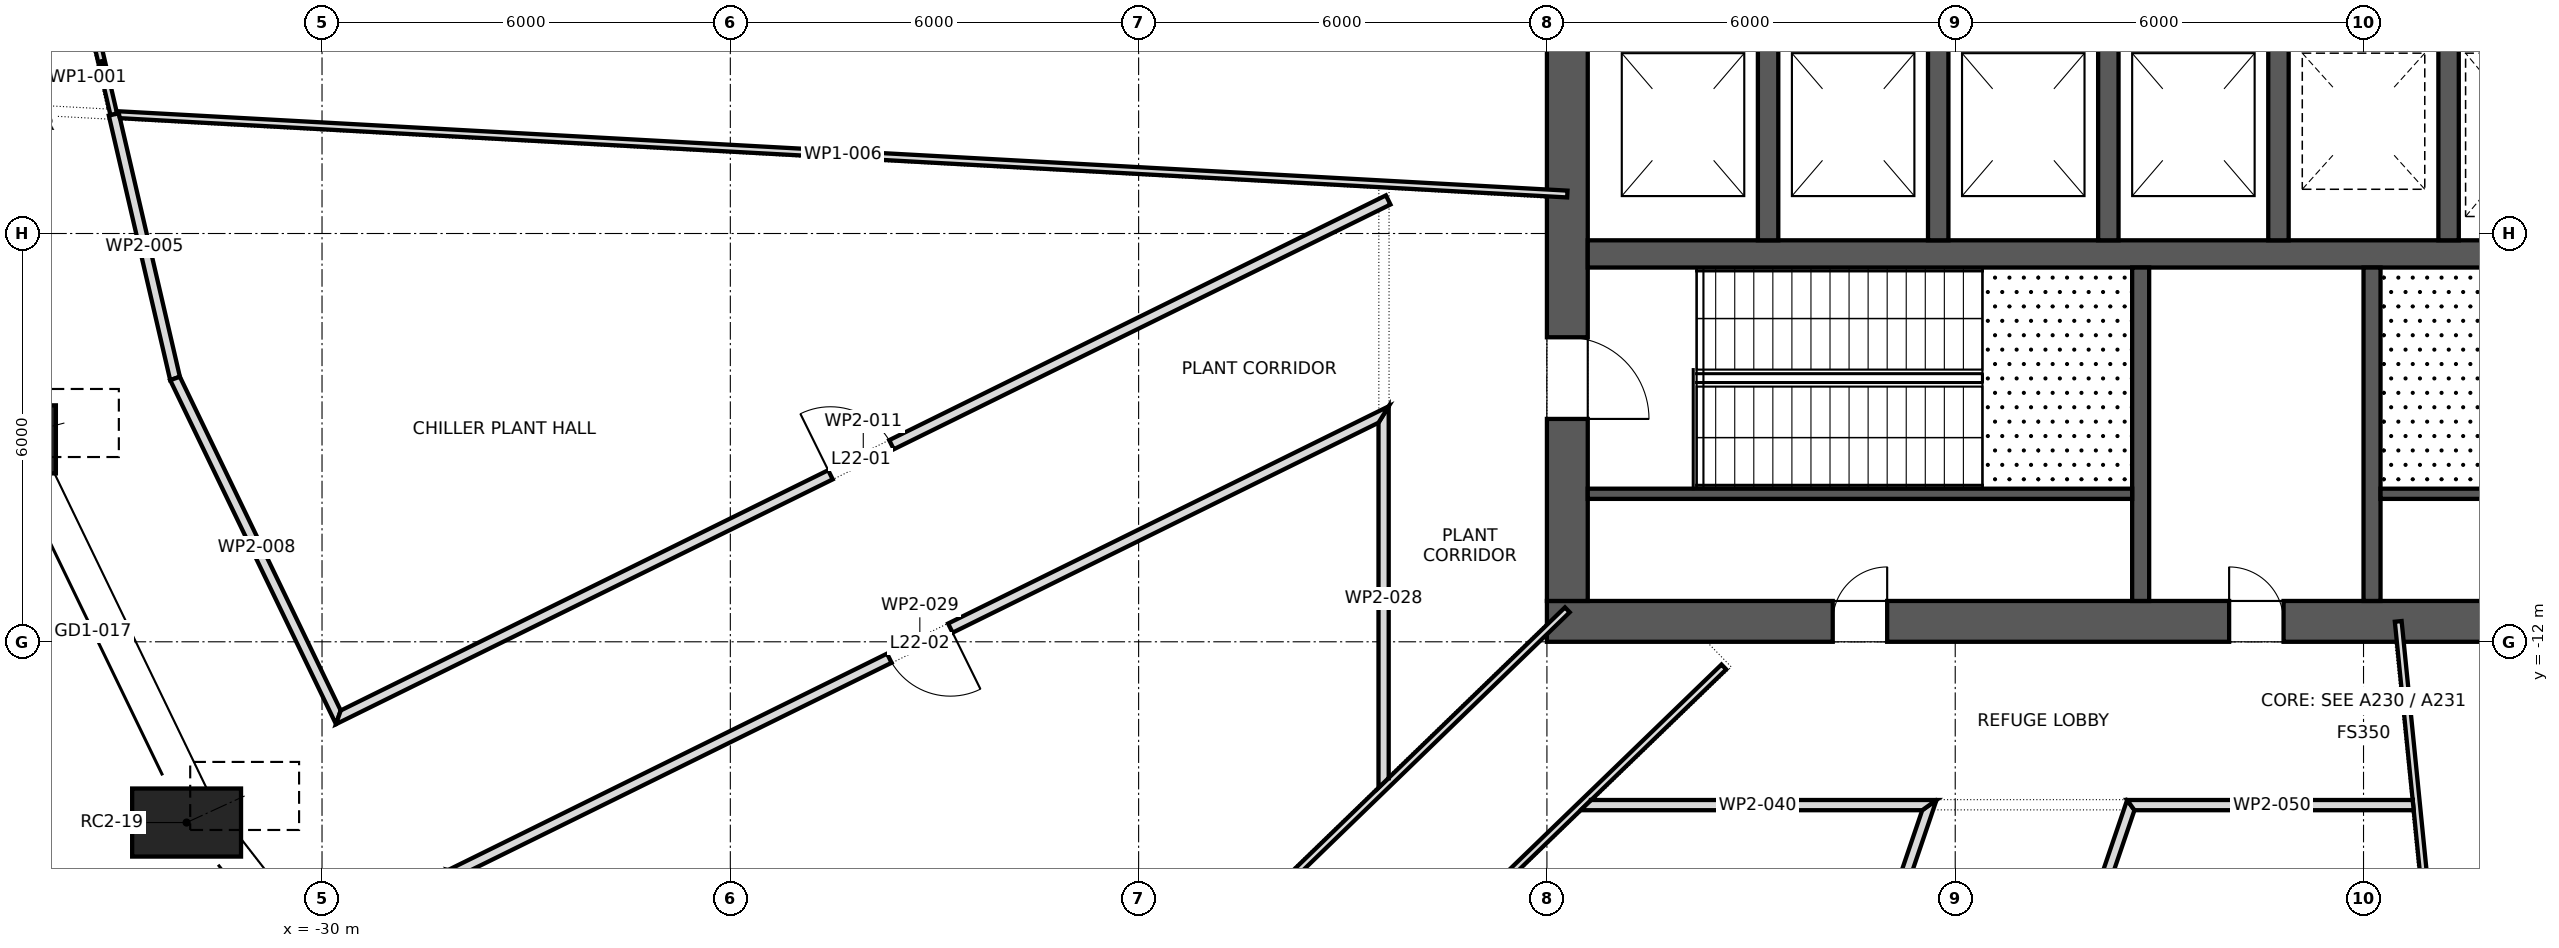
"""IFC4 building model, lengths in metres.
Left out: names, types, materials, properties, quantities, classifications, styles, units other than length and angle.
Written with IfcOpenShell. Run it as: python <this file> out.ifc"""

import sys

from ifc_helpers import new_model, si_unit, direction, frame, frame_2d, origin, origin_2d, place, context, subcontext, project, spatial, polyline, rectangle, outline, extrude, element, fill, save


model = new_model("IFC4")
c1 = context("Model", 3, precision=1e-05, world=origin(), true_north=direction((0.0, 1.0)))
c2 = subcontext(c1, "Body", "Model", "MODEL_VIEW")
j1 = project(units=[si_unit("LENGTHUNIT", "METRE"), si_unit("PLANEANGLEUNIT", "RADIAN")], contexts=[c1])
p1 = place(None, origin())
s1 = spatial("IfcSite", under=j1, at=p1, CompositionType="ELEMENT")
p2 = place(p1, origin())
s2 = spatial("IfcBuilding", under=s1, at=p2, CompositionType="ELEMENT")
p3 = place(p2, frame((0.0, 0.0, 99.1)))
s3 = spatial("IfcBuildingStorey", under=s2, at=p3, CompositionType="ELEMENT", Elevation=99.1)
p4 = place(p3, frame((-34.711, -9.025, 0.09), z_axis=(0.174299234712, 0.045357362213, 0.983647541791), x_axis=(-0.251839594723, 0.967768990271, 0.0)))
e1 = element("IfcColumn", 1, at=p4, inside=s3, PredefinedType="COLUMN", context=c2, shape_type="SweptSolid", body=[
    extrude(rectangle(XDim=1.6, YDim=1.0, at=origin_2d()), origin(), (0.0, 0.0, 1.0), 5.307),
])
p5 = place(p3, frame((-31.99, -14.656, 0.088), z_axis=(0.160721780276, 0.073644982891, 0.984248406572), x_axis=(-0.416565116305, 0.909105881555, 0.0)))
e2 = element("IfcColumn", 2, at=p5, inside=s3, PredefinedType="COLUMN", context=c2, shape_type="SweptSolid", body=[
    extrude(rectangle(XDim=1.6, YDim=1.0, at=origin_2d()), origin(), (0.0, 0.0, 1.0), 5.307),
])
p6 = place(p3, frame((-12.0, -11.7, 0.0), z_axis=(0.0, 0.0, 1.0), x_axis=(1.0, 0.0, 0.0)))
e3 = element("IfcWall", 3, at=p6, inside=s3, PredefinedType="SHEAR", context=c2, shape_type="SweptSolid", body=[
    extrude(rectangle(XDim=24.0, YDim=0.6, at=frame_2d((12.0, 0.0))), origin(), (0.0, 0.0, 1.0), 5.4),
])
p7 = place(p6, frame((10.025, 0.0, 0.0)))
e4 = element("IfcOpeningElement", 4, at=p7, cuts=e3, PredefinedType="OPENING", context=c2, shape_type="SweptSolid", body=[
    extrude(rectangle(XDim=0.8, YDim=2.1, at=frame_2d((0.4, 1.05))), frame((0.0, 0.312, 0.0), z_axis=(0.0, -1.0, 0.0), x_axis=(1.0, 0.0, 0.0)), (0.0, 0.0, 1.0), 0.624),
])
p8 = place(p6, frame((4.2, 0.0, 0.0)))
e5 = element("IfcOpeningElement", 5, at=p8, cuts=e3, PredefinedType="OPENING", context=c2, shape_type="SweptSolid", body=[
    extrude(rectangle(XDim=0.8, YDim=2.1, at=frame_2d((0.4, 1.05))), frame((0.0, 0.312, 0.0), z_axis=(0.0, -1.0, 0.0), x_axis=(1.0, 0.0, 0.0)), (0.0, 0.0, 1.0), 0.624),
])
p9 = place(p6, frame((15.85, 0.0, 0.0)))
e6 = element("IfcOpeningElement", 6, at=p9, cuts=e3, PredefinedType="OPENING", context=c2, shape_type="SweptSolid", body=[
    extrude(rectangle(XDim=0.8, YDim=2.1, at=frame_2d((0.4, 1.05))), frame((0.0, 0.312, 0.0), z_axis=(0.0, -1.0, 0.0), x_axis=(1.0, 0.0, 0.0)), (0.0, 0.0, 1.0), 0.624),
])
p10 = place(p3, frame((-11.7, -11.4, 0.0), z_axis=(0.0, 0.0, 1.0), x_axis=(0.0, 1.0, 0.0)))
e7 = element("IfcWall", 7, at=p10, inside=s3, PredefinedType="SHEAR", context=c2, shape_type="SweptSolid", body=[
    extrude(rectangle(XDim=22.8, YDim=0.6, at=frame_2d((11.4, 0.0))), origin(), (0.0, 0.0, 1.0), 5.4),
])
p11 = place(p10, frame((10.2, 0.0, 0.0)))
e8 = element("IfcOpeningElement", 8, at=p11, cuts=e7, PredefinedType="OPENING", context=c2, shape_type="SweptSolid", body=[
    extrude(rectangle(XDim=2.4, YDim=2.1, at=frame_2d((1.2, 1.05))), frame((0.0, 0.312, 0.0), z_axis=(0.0, -1.0, 0.0), x_axis=(1.0, 0.0, 0.0)), (0.0, 0.0, 1.0), 0.624),
])
p12 = place(p10, frame((18.925, 0.0, 0.0)))
e9 = element("IfcOpeningElement", 9, at=p12, cuts=e7, PredefinedType="OPENING", context=c2, shape_type="SweptSolid", body=[
    extrude(rectangle(XDim=1.2, YDim=2.1, at=frame_2d((0.6, 1.05))), frame((0.0, 0.312, 0.0), z_axis=(0.0, -1.0, 0.0), x_axis=(1.0, 0.0, 0.0)), (0.0, 0.0, 1.0), 0.624),
])
p13 = place(p10, frame((2.675, 0.0, 0.0)))
e10 = element("IfcOpeningElement", 10, at=p13, cuts=e7, PredefinedType="OPENING", context=c2, shape_type="SweptSolid", body=[
    extrude(rectangle(XDim=1.2, YDim=2.1, at=frame_2d((0.6, 1.05))), frame((0.0, 0.312, 0.0), z_axis=(0.0, -1.0, 0.0), x_axis=(1.0, 0.0, 0.0)), (0.0, 0.0, 1.0), 0.624),
])
p14 = place(p3, frame((-11.4, -6.3, 0.0), z_axis=(0.0, 0.0, 1.0), x_axis=(1.0, 0.0, 0.0)))
e11 = element("IfcWall", 11, at=p14, inside=s3, PredefinedType="SHEAR", context=c2, shape_type="SweptSolid", body=[
    extrude(rectangle(XDim=22.8, YDim=0.4, at=frame_2d((11.4, 0.0))), origin(), (0.0, 0.0, 1.0), 5.4),
])
p15 = place(p14, frame((20.85, 0.0, 0.0)))
e12 = element("IfcOpeningElement", 12, at=p15, cuts=e11, PredefinedType="OPENING", context=c2, shape_type="SweptSolid", body=[
    extrude(rectangle(XDim=1.1, YDim=2.1, at=frame_2d((0.55, 1.05))), frame((0.0, 0.212, 0.0), z_axis=(0.0, -1.0, 0.0), x_axis=(1.0, 0.0, 0.0)), (0.0, 0.0, 1.0), 0.424),
])
for number, where, z_axis, x_axis in (
    (13, (-8.75, -6.1, 0.0), (0.0, 0.0, 1.0), (0.0, 1.0, 0.0)),
    (14, (-6.25, -6.1, 0.0), (0.0, 0.0, 1.0), (0.0, 1.0, 0.0)),
    (15, (-3.75, -6.1, 0.0), (0.0, 0.0, 1.0), (0.0, 1.0, 0.0)),
    (16, (-1.25, -6.1, 0.0), (0.0, 0.0, 1.0), (0.0, 1.0, 0.0)),
    (17, (1.25, -6.1, 0.0), (0.0, 0.0, 1.0), (0.0, 1.0, 0.0)),
):
    element("IfcWall", number, at=place(p3, frame(where, z_axis=z_axis, x_axis=x_axis)), inside=s3, PredefinedType="SHEAR", context=c2, shape_type="SweptSolid", body=[
        extrude(rectangle(XDim=2.9, YDim=0.3, at=frame_2d((1.45, 0.0))), origin(), (0.0, 0.0, 1.0), 5.4),
    ])
for number, where, z_axis, x_axis in (
    (18, (-3.275, -11.4, 0.0), (0.0, 0.0, 1.0), (0.0, 1.0, 0.0)),
    (19, (0.125, -11.4, 0.0), (0.0, 0.0, 1.0), (0.0, 1.0, 0.0)),
):
    element("IfcWall", number, at=place(p3, frame(where, z_axis=z_axis, x_axis=x_axis)), inside=s3, PredefinedType="SHEAR", context=c2, shape_type="SweptSolid", body=[
        extrude(rectangle(XDim=4.9, YDim=0.25, at=frame_2d((2.45, 0.0))), origin(), (0.0, 0.0, 1.0), 5.1),
    ])
for number, where, z_axis, x_axis in (
    (20, (-11.4, -9.825, 0.0), (0.0, 0.0, 1.0), (1.0, 0.0, 0.0)),
    (21, (0.25, -9.825, 0.0), (0.0, 0.0, 1.0), (1.0, 0.0, 0.0)),
):
    element("IfcWall", number, at=place(p3, frame(where, z_axis=z_axis, x_axis=x_axis)), inside=s3, PredefinedType="SHEAR", context=c2, shape_type="SweptSolid", body=[
        extrude(rectangle(XDim=8.0, YDim=0.15, at=frame_2d((4.0, 0.0))), origin(), (0.0, 0.0, 1.0), 5.1),
    ])
p16 = place(p3, frame((-33.411, -2.734, 0.0), z_axis=(0.0, 0.0, 1.0), x_axis=(0.225810628432, -0.974171217029, 0.0)))
e22 = element("IfcWall", 22, at=p16, inside=s3, PredefinedType="PARTITIONING", context=c2, shape_type="SweptSolid", body=[
    extrude(outline(polyline([(1.556, 0.05), (0.011, 0.05), (0.0, -0.05), (1.556, -0.05), (1.556, 0.05)])), origin(), (0.0, 0.0, 1.0), 5.1),
])
p17 = place(p3, frame((-33.06, -4.25, 0.0), z_axis=(0.0, 0.0, 1.0), x_axis=(0.225949368313, -0.974139047035, 0.0)))
e23 = element("IfcWall", 23, at=p17, inside=s3, PredefinedType="PARTITIONING", context=c2, shape_type="SweptSolid", body=[
    extrude(outline(polyline([(0.0, -0.075), (1.996, -0.075), (3.991, -0.075), (3.975, 0.075), (1.987, 0.075), (0.0, 0.075), (0.0, -0.075)])), origin(), (0.0, 0.0, 1.0), 5.1),
])
p18 = place(p3, frame((-33.022, -4.252, 0.0), z_axis=(0.0, 0.0, 1.0), x_axis=(0.998503734749, -0.054683559624, 0.0)))
e24 = element("IfcWall", 24, at=p18, inside=s3, PredefinedType="PARTITIONING", context=c2, shape_type="SweptSolid", body=[
    extrude(outline(polyline([(0.0, 0.05), (0.0, 0.049), (0.01, 0.014), (0.034, 0.021), (0.055, -0.05), (1.991, -0.05), (3.927, -0.05), (5.864, -0.05), (7.8, -0.05), (9.736, -0.05), (11.673, -0.05), (13.609, -0.05), (15.545, -0.05), (17.482, -0.05), (19.418, -0.05), (21.354, -0.05), (21.354, 0.05), (19.413, 0.05), (17.472, 0.05), (15.53, 0.05), (13.589, 0.05), (11.648, 0.05), (9.707, 0.05), (7.765, 0.05), (5.824, 0.05), (3.883, 0.05), (1.941, 0.05), (0.0, 0.05)])), origin(), (0.0, 0.0, 1.0), 5.1),
])
p19 = place(p3, frame((-32.164, -8.123, 0.0), z_axis=(0.0, 0.0, 1.0), x_axis=(0.434115125131, -0.900857401664, 0.0)))
e25 = element("IfcWall", 25, at=p19, inside=s3, PredefinedType="PARTITIONING", context=c2, shape_type="SweptSolid", body=[
    extrude(outline(polyline([(5.612, -0.075), (5.612, -0.075), (5.461, 0.075), (3.646, 0.075), (1.831, 0.075), (0.017, 0.075), (0.0, -0.074), (0.0, -0.075), (1.871, -0.075), (3.741, -0.075), (5.612, -0.075)])), origin(), (0.0, 0.0, 1.0), 5.1),
])
p20 = place(p3, frame((-29.828, -13.143, 0.0), z_axis=(0.0, 0.0, 1.0), x_axis=(0.896984577942, 0.442061836098, 0.0)))
e26 = element("IfcWall", 26, at=p20, inside=s3, PredefinedType="PARTITIONING", context=c2, shape_type="SweptSolid", body=[
    extrude(outline(polyline([(17.275, 0.075), (15.372, 0.075), (13.469, 0.075), (11.567, 0.075), (9.664, 0.075), (7.762, 0.075), (5.859, 0.075), (3.957, 0.075), (2.054, 0.075), (0.151, 0.075), (0.0, -0.075), (1.919, -0.075), (3.839, -0.075), (5.758, -0.075), (7.678, -0.075), (9.597, -0.075), (11.517, -0.075), (13.436, -0.075), (15.355, -0.075), (17.275, -0.075), (17.275, 0.075)])), origin(), (0.0, 0.0, 1.0), 5.1),
])
p21 = place(p20, frame((8.138, 0.0, 0.0)))
e27 = element("IfcOpeningElement", 27, at=p21, cuts=e26, PredefinedType="OPENING", context=c2, shape_type="SweptSolid", body=[
    extrude(rectangle(XDim=1.0, YDim=2.1, at=frame_2d((0.5, 1.05))), frame((0.0, 0.087, 0.0), z_axis=(0.0, -1.0, 0.0), x_axis=(1.0, 0.0, 0.0)), (0.0, 0.0, 1.0), 0.174),
])
p22 = place(p3, frame((-21.89, -21.391, 0.0), z_axis=(0.0, 0.0, 1.0), x_axis=(0.718607137454, 0.695416265269, 0.0)))
e28 = element("IfcWall", 28, at=p22, inside=s3, PredefinedType="PARTITIONING", context=c2, shape_type="SweptSolid", body=[
    extrude(outline(polyline([(14.18, 0.05), (12.378, 0.05), (10.576, 0.05), (10.573, 0.047), (10.57, 0.05), (8.811, 0.05), (7.052, 0.05), (5.292, 0.05), (3.533, 0.05), (1.774, 0.05), (0.015, 0.05), (0.019, 0.007), (0.0, 0.005), (0.0, -0.05), (1.772, -0.05), (3.545, -0.05), (5.318, -0.05), (7.09, -0.05), (8.863, -0.05), (10.635, -0.05), (12.408, -0.05), (14.18, -0.05), (14.18, 0.05)])), origin(), (0.0, 0.0, 1.0), 5.1),
])
p23 = place(p3, frame((-20.003, -22.624, 0.0), z_axis=(0.0, 0.0, 1.0), x_axis=(0.718850780889, 0.695164408478, 0.0)))
e29 = element("IfcWall", 29, at=p23, inside=s3, PredefinedType="PARTITIONING", context=c2, shape_type="SweptSolid", body=[
    extrude(outline(polyline([(0.054, -0.05), (2.043, -0.05), (4.031, -0.05), (6.02, -0.05), (8.008, -0.05), (9.997, -0.05), (11.985, -0.05), (11.987, -0.048), (11.989, -0.05), (13.369, -0.05), (14.75, -0.05), (14.75, 0.05), (12.906, 0.05), (11.062, 0.05), (9.219, 0.05), (7.375, 0.05), (5.531, 0.05), (3.688, 0.05), (1.844, 0.05), (0.0, 0.05), (0.0, 0.049), (0.01, 0.014), (0.034, 0.021), (0.054, -0.05)])), origin(), (0.0, 0.0, 1.0), 5.1),
])
p24 = place(p3, frame((-14.4, -14.147, 0.0), z_axis=(0.0, 0.0, 1.0), x_axis=(0.0, 1.0, 0.0)))
e30 = element("IfcWall", 30, at=p24, inside=s3, PredefinedType="PARTITIONING", context=c2, shape_type="SweptSolid", body=[
    extrude(outline(polyline([(0.146, -0.075), (1.967, -0.075), (3.787, -0.075), (5.608, -0.075), (5.487, 0.0), (5.367, 0.075), (3.578, 0.075), (1.79, 0.075), (0.001, 0.075), (0.146, -0.075)])), origin(), (0.0, 0.0, 1.0), 5.1),
])
p25 = place(p3, frame((-14.292, -8.607, 0.0), z_axis=(0.0, 0.0, 1.0), x_axis=(-0.896913310142, -0.442206415703, 0.0)))
e31 = element("IfcWall", 31, at=p25, inside=s3, PredefinedType="PARTITIONING", context=c2, shape_type="SweptSolid", body=[
    extrude(outline(polyline([(0.0, -0.075), (1.926, -0.075), (3.853, -0.075), (5.779, -0.075), (7.705, -0.075), (9.631, -0.075), (11.557, -0.075), (13.483, -0.075), (15.409, -0.075), (15.225, 0.075), (13.352, 0.075), (11.479, 0.075), (9.606, 0.075), (7.733, 0.075), (5.86, 0.075), (3.987, 0.075), (2.114, 0.075), (0.241, 0.075), (0.0, -0.075)])), origin(), (0.0, 0.0, 1.0), 5.1),
])
p26 = place(p25, frame((7.219, 0.0, 0.0)))
e32 = element("IfcOpeningElement", 32, at=p26, cuts=e31, PredefinedType="OPENING", context=c2, shape_type="SweptSolid", body=[
    extrude(rectangle(XDim=1.0, YDim=2.1, at=frame_2d((0.5, 1.05))), frame((0.0, 0.087, 0.0), z_axis=(0.0, -1.0, 0.0), x_axis=(1.0, 0.0, 0.0)), (0.0, 0.0, 1.0), 0.174),
])
p27 = place(p3, frame((-10.645, -26.942, 0.0), z_axis=(0.0, 0.0, 1.0), x_axis=(0.321926990849, 0.946764496886, 0.0)))
e33 = element("IfcWall", 33, at=p27, inside=s3, PredefinedType="PARTITIONING", context=c2, shape_type="SweptSolid", body=[
    extrude(outline(polyline([(13.352, -0.075), (13.352, -0.075), (13.143, 0.075), (11.287, 0.075), (9.431, 0.075), (7.575, 0.075), (5.719, 0.075), (3.864, 0.075), (2.008, 0.075), (0.152, 0.075), (0.0, -0.075), (1.907, -0.075), (3.815, -0.075), (5.722, -0.075), (7.63, -0.075), (9.537, -0.075), (11.444, -0.075), (13.352, -0.075)])), origin(), (0.0, 0.0, 1.0), 5.1),
])
p28 = place(p27, frame((6.162, 0.0, 0.0)))
e34 = element("IfcOpeningElement", 34, at=p28, cuts=e33, PredefinedType="OPENING", context=c2, shape_type="SweptSolid", body=[
    extrude(rectangle(XDim=1.0, YDim=2.1, at=frame_2d((0.5, 1.05))), frame((0.0, 0.087, 0.0), z_axis=(0.0, -1.0, 0.0), x_axis=(1.0, 0.0, 0.0)), (0.0, 0.0, 1.0), 0.174),
])
p29 = place(p3, frame((-6.275, -14.4, 0.0), z_axis=(0.0, 0.0, 1.0), x_axis=(-1.0, 0.0, 0.0)))
e35 = element("IfcWall", 35, at=p29, inside=s3, PredefinedType="PARTITIONING", context=c2, shape_type="SweptSolid", body=[
    extrude(outline(polyline([(0.0, -0.075), (1.691, -0.075), (3.383, -0.075), (5.074, -0.075), (5.229, 0.075), (5.229, 0.075), (3.556, 0.075), (1.882, 0.075), (0.209, 0.075), (0.104, 0.0), (0.0, -0.075), (0.0, -0.075)])), origin(), (0.0, 0.0, 1.0), 5.1),
])
p30 = place(p3, frame((-3.403, -14.349, 0.0), z_axis=(0.0, 0.0, 1.0), x_axis=(-0.32208303293, -0.946711423771, 0.0)))
e36 = element("IfcWall", 36, at=p30, inside=s3, PredefinedType="PARTITIONING", context=c2, shape_type="SweptSolid", body=[
    extrude(outline(polyline([(0.0, -0.075), (1.994, -0.075), (3.988, -0.075), (5.982, -0.075), (7.976, -0.075), (9.97, -0.075), (11.964, -0.075), (13.958, -0.075), (13.782, 0.075), (11.829, 0.075), (9.875, 0.075), (7.922, 0.075), (5.968, 0.075), (4.015, 0.075), (2.061, 0.075), (0.107, 0.075), (0.0, -0.075)])), origin(), (0.0, 0.0, 1.0), 5.1),
])
p31 = place(p30, frame((6.462, 0.0, 0.0)))
e37 = element("IfcOpeningElement", 37, at=p31, cuts=e36, PredefinedType="OPENING", context=c2, shape_type="SweptSolid", body=[
    extrude(rectangle(XDim=1.0, YDim=2.1, at=frame_2d((0.5, 1.05))), frame((0.0, 0.087, 0.0), z_axis=(0.0, -1.0, 0.0), x_axis=(1.0, 0.0, 0.0)), (0.0, 0.0, 1.0), 0.174),
])
p32 = place(p3, frame((0.51, -11.7, 0.0), z_axis=(0.0, 0.0, 1.0), x_axis=(0.09951245757, -0.995036316316, 0.0)))
e38 = element("IfcWall", 38, at=p32, inside=s3, PredefinedType="PARTITIONING", context=c2, shape_type="SweptSolid", body=[
    extrude(outline(polyline([(0.0, -0.05), (1.317, -0.05), (2.633, -0.05), (2.633, -0.05), (2.636, -0.05), (4.625, -0.05), (6.615, -0.05), (8.604, -0.05), (10.594, -0.05), (12.583, -0.05), (14.573, -0.05), (16.562, -0.05), (16.568, 0.011), (16.593, 0.009), (16.597, 0.045), (16.597, 0.05), (14.753, 0.05), (12.909, 0.05), (11.065, 0.05), (9.22, 0.05), (7.376, 0.05), (5.532, 0.05), (3.688, 0.05), (1.844, 0.05), (0.0, 0.05), (0.0, -0.05)])), origin(), (0.0, 0.0, 1.0), 5.1),
])
p33 = place(p3, frame((0.737, -14.4, 0.0), z_axis=(0.0, 0.0, 1.0), x_axis=(-1.0, 0.0, 0.0)))
e39 = element("IfcWall", 39, at=p33, inside=s3, PredefinedType="PARTITIONING", context=c2, shape_type="SweptSolid", body=[
    extrude(outline(polyline([(4.211, -0.075), (4.211, -0.075), (4.157, 0.0), (4.104, 0.075), (2.736, 0.075), (1.368, 0.075), (0.0, 0.075), (0.0, 0.073), (0.015, -0.075), (1.413, -0.075), (2.812, -0.075), (4.211, -0.075)])), origin(), (0.0, 0.0, 1.0), 5.1),
])
p34 = place(p13, frame((1.2, 0.0, 0.0), z_axis=(0.0, 0.0, 1.0), x_axis=(-1.0, 0.0, 0.0)))
e40 = element("IfcDoor", 40, at=p34, inside=s3, OperationType="SINGLE_SWING_LEFT", PredefinedType="DOOR", context=c2, shape_type="SweptSolid", body=[
    extrude(rectangle(XDim=1.2, YDim=2.1, at=frame_2d((0.6, 1.05))), frame((0.0, 0.025, 0.0), z_axis=(0.0, -1.0, 0.0), x_axis=(1.0, 0.0, 0.0)), (0.0, 0.0, 1.0), 0.05),
])
fill(e10, e40)
p35 = place(p7, origin())
e41 = element("IfcDoor", 41, at=p35, inside=s3, OperationType="SINGLE_SWING_RIGHT", PredefinedType="DOOR", context=c2, shape_type="SweptSolid", body=[
    extrude(rectangle(XDim=0.8, YDim=2.1, at=frame_2d((0.4, 1.05))), frame((0.0, 0.025, 0.0), z_axis=(0.0, -1.0, 0.0), x_axis=(1.0, 0.0, 0.0)), (0.0, 0.0, 1.0), 0.05),
])
fill(e4, e41)
p36 = place(p8, origin())
e42 = element("IfcDoor", 42, at=p36, inside=s3, OperationType="SINGLE_SWING_LEFT", PredefinedType="DOOR", context=c2, shape_type="SweptSolid", body=[
    extrude(rectangle(XDim=0.8, YDim=2.1, at=frame_2d((0.4, 1.05))), frame((0.0, 0.025, 0.0), z_axis=(0.0, -1.0, 0.0), x_axis=(1.0, 0.0, 0.0)), (0.0, 0.0, 1.0), 0.05),
])
fill(e5, e42)
p37 = place(p21, origin())
e43 = element("IfcDoor", 43, at=p37, inside=s3, OperationType="SINGLE_SWING_RIGHT", PredefinedType="DOOR", context=c2, shape_type="SweptSolid", body=[
    extrude(rectangle(XDim=1.0, YDim=2.1, at=frame_2d((0.5, 1.05))), frame((0.0, 0.025, 0.0), z_axis=(0.0, -1.0, 0.0), x_axis=(1.0, 0.0, 0.0)), (0.0, 0.0, 1.0), 0.05),
])
fill(e27, e43)
p38 = place(p26, origin())
e44 = element("IfcDoor", 44, at=p38, inside=s3, OperationType="SINGLE_SWING_RIGHT", PredefinedType="DOOR", context=c2, shape_type="SweptSolid", body=[
    extrude(rectangle(XDim=1.0, YDim=2.1, at=frame_2d((0.5, 1.05))), frame((0.0, 0.025, 0.0), z_axis=(0.0, -1.0, 0.0), x_axis=(1.0, 0.0, 0.0)), (0.0, 0.0, 1.0), 0.05),
])
fill(e32, e44)
save(model, sys.argv[1])
